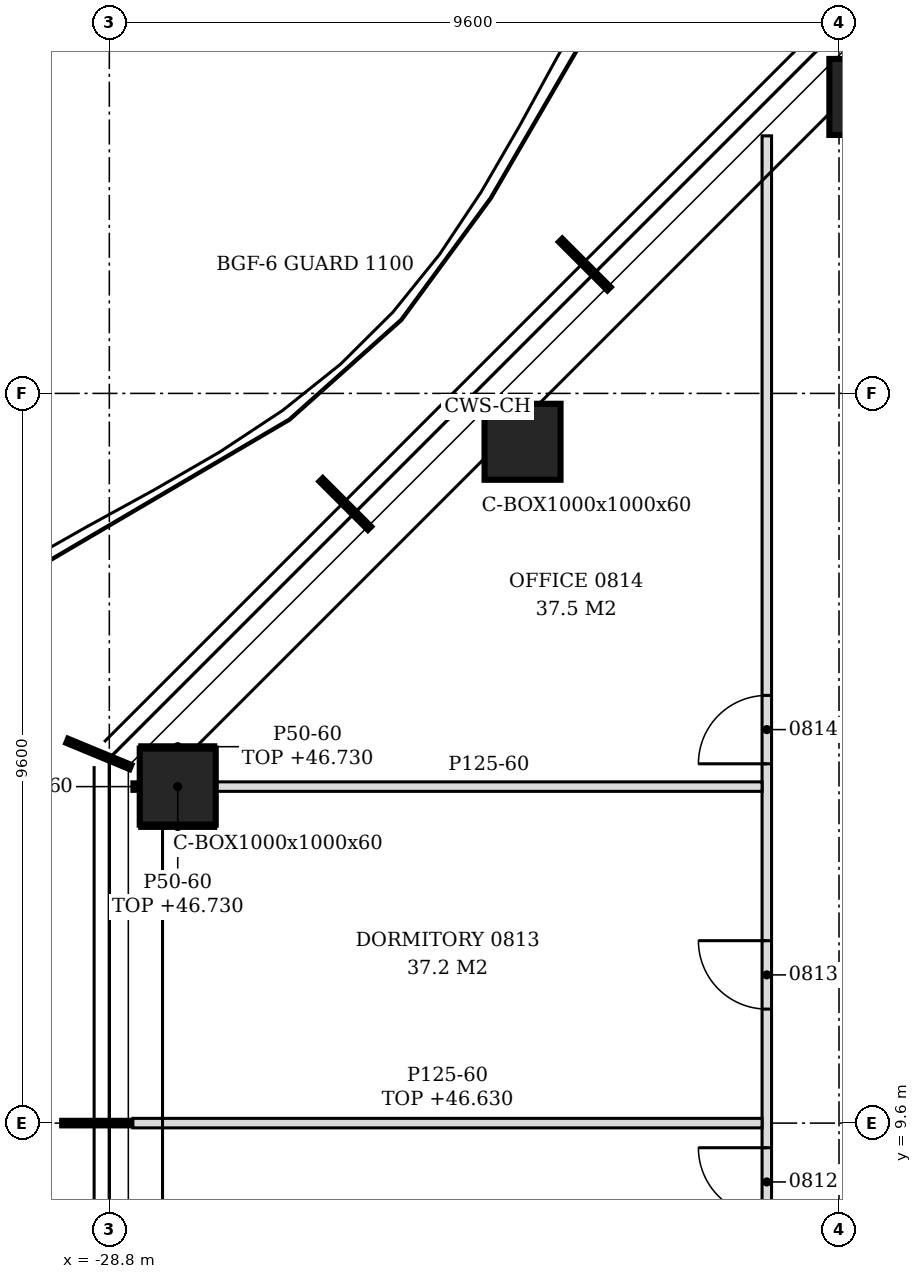
"""IFC4 building model, lengths in metres.
Left out: names, types, materials, properties, quantities, classifications, styles, units other than length and angle.
Written with IfcOpenShell. Run it as: python <this file> out.ifc"""

import sys

from ifc_helpers import new_model, si_unit, direction, frame, frame_2d, origin, origin_2d, place, context, subcontext, project, spatial, polyline, rectangle, hollow_rectangle, outline, extrude, element, fill, save


model = new_model("IFC4")
c1 = context("Model", 3, precision=1e-05, world=origin(), true_north=direction((0.0, 1.0)))
c2 = subcontext(c1, "Body", "Model", "MODEL_VIEW")
j1 = project(units=[si_unit("LENGTHUNIT", "METRE"), si_unit("PLANEANGLEUNIT", "RADIAN")], contexts=[c1])
p1 = place(None, origin())
s1 = spatial("IfcSite", under=j1, at=p1, CompositionType="ELEMENT")
p2 = place(p1, origin())
s2 = spatial("IfcBuilding", under=s1, at=p2, CompositionType="ELEMENT")
p3 = place(p2, frame((0.0, 0.0, 43.8)))
s3 = spatial("IfcBuildingStorey", under=s2, at=p3, CompositionType="ELEMENT", Elevation=43.8)
for number, where, z_axis, x_axis in (
    (1, (-18.827, 23.1, -0.15), (0.0, 0.0, 1.0), (1.0, 0.0, 0.0)),
    (2, (-23.364, 18.564, -0.15), (0.0, 0.0, 1.0), (1.0, 0.0, 0.0)),
    (3, (-27.9, 14.027, -0.15), (0.0, 0.0, 1.0), (1.0, 0.0, 0.0)),
):
    element("IfcColumn", number, at=place(p3, frame(where, z_axis=z_axis, x_axis=x_axis)), inside=s3, PredefinedType="COLUMN", context=c2, shape_type="SweptSolid", body=[
        extrude(hollow_rectangle(XDim=1.0, YDim=1.0, WallThickness=0.06, at=origin_2d()), origin(), (0.0, 0.0, 1.0), 3.6),
    ])
p4 = place(p3, frame((-20.15, -15.288, 0.0), z_axis=(0.0, 0.0, 1.0), x_axis=(0.0, 1.0, 0.0)))
e4 = element("IfcWall", 4, at=p4, inside=s3, PredefinedType="PARTITIONING", context=c2, shape_type="SweptSolid", body=[
    extrude(outline(polyline([(0.0, 0.0), (37.876, 0.0), (37.876, 3.45), (37.622, 3.45), (37.62, 2.63), (36.507, 2.63), (36.505, 3.45), (34.583, 3.45), (34.581, 2.98), (34.393, 2.98), (34.39, 3.45), (29.798, 3.45), (29.795, 2.83), (29.577, 2.83), (29.575, 3.45), (24.998, 3.45), (24.996, 2.83), (24.778, 2.83), (24.775, 3.45), (20.198, 3.45), (20.196, 2.83), (19.978, 2.83), (19.976, 3.45), (15.397, 3.45), (15.396, 2.83), (15.177, 2.83), (15.176, 3.45), (10.597, 3.45), (10.595, 2.83), (10.377, 2.83), (10.375, 3.45), (5.798, 3.45), (5.795, 2.83), (5.577, 2.83), (5.575, 3.45), (0.998, 3.45), (0.996, 2.83), (0.778, 2.83), (0.775, 3.45), (0.0, 3.45), (0.0, 0.0)])), frame((0.0, 0.062, 0.0), z_axis=(0.0, -1.0, 0.0), x_axis=(1.0, 0.0, 0.0)), (0.0, 0.0, 1.0), 0.125),
])
p5 = place(p4, frame((9.337, 0.0, 0.0)))
e5 = element("IfcOpeningElement", 5, at=p5, cuts=e4, PredefinedType="OPENING", context=c2, shape_type="SweptSolid", body=[
    extrude(rectangle(XDim=0.9, YDim=2.1, at=frame_2d((0.45, 1.05))), frame((0.0, 0.073, 0.0), z_axis=(0.0, -1.0, 0.0), x_axis=(1.0, 0.0, 0.0)), (0.0, 0.0, 1.0), 0.145),
])
p6 = place(p4, frame((10.912, 0.0, 0.0)))
e6 = element("IfcOpeningElement", 6, at=p6, cuts=e4, PredefinedType="OPENING", context=c2, shape_type="SweptSolid", body=[
    extrude(rectangle(XDim=0.9, YDim=2.1, at=frame_2d((0.45, 1.05))), frame((0.0, 0.073, 0.0), z_axis=(0.0, -1.0, 0.0), x_axis=(1.0, 0.0, 0.0)), (0.0, 0.0, 1.0), 0.145),
])
p7 = place(p4, frame((16.488, 0.0, 0.0)))
e7 = element("IfcOpeningElement", 7, at=p7, cuts=e4, PredefinedType="OPENING", context=c2, shape_type="SweptSolid", body=[
    extrude(rectangle(XDim=0.9, YDim=2.1, at=frame_2d((0.45, 1.05))), frame((0.0, 0.073, 0.0), z_axis=(0.0, -1.0, 0.0), x_axis=(1.0, 0.0, 0.0)), (0.0, 0.0, 1.0), 0.145),
])
p8 = place(p4, frame((23.664, 0.0, 0.0)))
e8 = element("IfcOpeningElement", 8, at=p8, cuts=e4, PredefinedType="OPENING", context=c2, shape_type="SweptSolid", body=[
    extrude(rectangle(XDim=0.9, YDim=2.1, at=frame_2d((0.45, 1.05))), frame((0.0, 0.073, 0.0), z_axis=(0.0, -1.0, 0.0), x_axis=(1.0, 0.0, 0.0)), (0.0, 0.0, 1.0), 0.145),
])
p9 = place(p4, frame((26.387, 0.0, 0.0)))
e9 = element("IfcOpeningElement", 9, at=p9, cuts=e4, PredefinedType="OPENING", context=c2, shape_type="SweptSolid", body=[
    extrude(rectangle(XDim=0.9, YDim=2.1, at=frame_2d((0.45, 1.05))), frame((0.0, 0.073, 0.0), z_axis=(0.0, -1.0, 0.0), x_axis=(1.0, 0.0, 0.0)), (0.0, 0.0, 1.0), 0.145),
])
p10 = place(p4, frame((29.615, 0.0, 0.0)))
e10 = element("IfcOpeningElement", 10, at=p10, cuts=e4, PredefinedType="OPENING", context=c2, shape_type="SweptSolid", body=[
    extrude(rectangle(XDim=0.9, YDim=2.1, at=frame_2d((0.45, 1.05))), frame((0.0, 0.073, 0.0), z_axis=(0.0, -1.0, 0.0), x_axis=(1.0, 0.0, 0.0)), (0.0, 0.0, 1.0), 0.145),
])
p11 = place(p3, frame((-28.49, 9.6, 0.0), z_axis=(0.0, 0.0, 1.0), x_axis=(1.0, 0.0, 0.0)))
e11 = element("IfcWall", 11, at=p11, inside=s3, PredefinedType="PARTITIONING", context=c2, shape_type="SweptSolid", body=[
    extrude(rectangle(XDim=8.278, YDim=0.125, at=frame_2d((4.139, 0.0))), origin(), (0.0, 0.0, 1.0), 2.83),
])
p12 = place(p3, frame((-28.503, 14.027, 0.0), z_axis=(0.0, 0.0, 1.0), x_axis=(1.0, 0.0, 0.0)))
e12 = element("IfcWall", 12, at=p12, inside=s3, PredefinedType="PARTITIONING", context=c2, shape_type="SweptSolid", body=[
    extrude(rectangle(XDim=0.103, YDim=0.125, at=frame_2d((0.052, 0.0))), origin(), (0.0, 0.0, 1.0), 3.45),
])
p13 = place(p3, frame((-27.4, 14.027, 0.0), z_axis=(0.0, 0.0, 1.0), x_axis=(1.0, 0.0, 0.0)))
e13 = element("IfcWall", 13, at=p13, inside=s3, PredefinedType="PARTITIONING", context=c2, shape_type="SweptSolid", body=[
    extrude(rectangle(XDim=7.188, YDim=0.125, at=frame_2d((3.594, 0.0))), origin(), (0.0, 0.0, 1.0), 3.45),
])
for number, where, z_axis, x_axis in (
    (14, (-28.4, 14.552, 0.0), (0.0, 0.0, 1.0), (1.0, 0.0, 0.0)),
    (15, (-28.4, 13.502, 0.0), (0.0, 0.0, 1.0), (1.0, 0.0, 0.0)),
):
    element("IfcWall", number, at=place(p3, frame(where, z_axis=z_axis, x_axis=x_axis)), inside=s3, PredefinedType="PARTITIONING", context=c2, shape_type="SweptSolid", body=[
        extrude(rectangle(XDim=1.0, YDim=0.05, at=frame_2d((0.5, 0.0))), origin(), (0.0, 0.0, 1.0), 2.93),
    ])
p14 = place(p8, origin())
e16 = element("IfcDoor", 16, at=p14, inside=s3, OperationType="SINGLE_SWING_RIGHT", PredefinedType="DOOR", context=c2, shape_type="SweptSolid", body=[
    extrude(rectangle(XDim=0.9, YDim=2.1, at=frame_2d((0.45, 1.05))), frame((0.0, 0.025, 0.0), z_axis=(0.0, -1.0, 0.0), x_axis=(1.0, 0.0, 0.0)), (0.0, 0.0, 1.0), 0.05),
])
fill(e8, e16)
p15 = place(p9, origin())
e17 = element("IfcDoor", 17, at=p15, inside=s3, OperationType="SINGLE_SWING_RIGHT", PredefinedType="DOOR", context=c2, shape_type="SweptSolid", body=[
    extrude(rectangle(XDim=0.9, YDim=2.1, at=frame_2d((0.45, 1.05))), frame((0.0, 0.025, 0.0), z_axis=(0.0, -1.0, 0.0), x_axis=(1.0, 0.0, 0.0)), (0.0, 0.0, 1.0), 0.05),
])
fill(e9, e17)
p16 = place(p10, origin())
e18 = element("IfcDoor", 18, at=p16, inside=s3, OperationType="SINGLE_SWING_LEFT", PredefinedType="DOOR", context=c2, shape_type="SweptSolid", body=[
    extrude(rectangle(XDim=0.9, YDim=2.1, at=frame_2d((0.45, 1.05))), frame((0.0, 0.025, 0.0), z_axis=(0.0, -1.0, 0.0), x_axis=(1.0, 0.0, 0.0)), (0.0, 0.0, 1.0), 0.05),
])
fill(e10, e18)
save(model, sys.argv[1])
